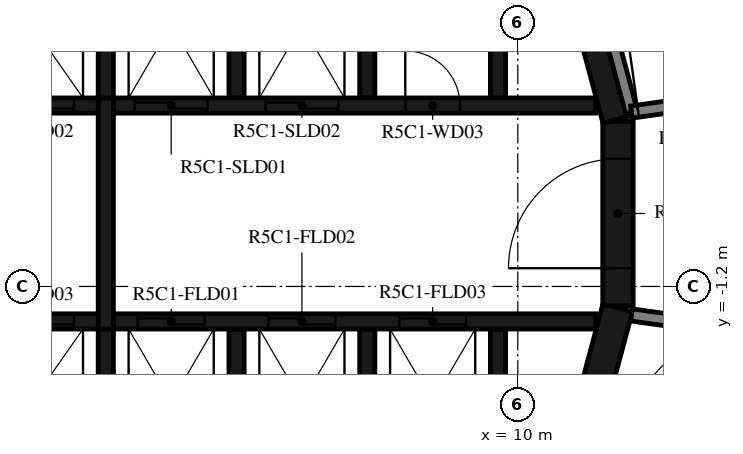
"""IFC4 building model, lengths in metres.
Left out: names, types, materials, properties, quantities, classifications, styles, units other than length and angle.
Written with IfcOpenShell. Run it as: python <this file> out.ifc"""

import sys

from ifc_helpers import new_model, si_unit, direction, frame, frame_2d, origin, place, context, subcontext, project, spatial, polyline, rectangle, outline, extrude, element, fill, save


model = new_model("IFC4")
c1 = context("Model", 3, precision=1e-05, world=origin(), true_north=direction((0.0, 1.0)))
c2 = subcontext(c1, "Body", "Model", "MODEL_VIEW")
j1 = project(units=[si_unit("LENGTHUNIT", "METRE"), si_unit("PLANEANGLEUNIT", "RADIAN")], contexts=[c1])
p1 = place(None, origin())
s1 = spatial("IfcSite", under=j1, at=p1, CompositionType="ELEMENT")
p2 = place(p1, origin())
s2 = spatial("IfcBuilding", under=s1, at=p2, CompositionType="ELEMENT")
p3 = place(p2, frame((0.0, 0.0, 212.9)))
s3 = spatial("IfcBuildingStorey", under=s2, at=p3, CompositionType="ELEMENT", Elevation=212.9)
p4 = place(p3, frame((10.858, -4.479, 0.0), z_axis=(0.0, 0.0, 1.0), x_axis=(0.258734743916, 0.965948410781, 0.0)))
e1 = element("IfcWall", 1, at=p4, inside=s3, PredefinedType="SHEAR", context=c2, shape_type="SweptSolid", body=[
    extrude(rectangle(XDim=3.033, YDim=0.5, at=frame_2d((1.516, 0.0))), origin(), (0.0, 0.0, 1.0), 3.12),
])
p5 = place(p3, frame((11.647, -1.516, 0.0), z_axis=(0.0, 0.0, 1.0), x_axis=(0.0, 1.0, 0.0)))
e2 = element("IfcWall", 2, at=p5, inside=s3, PredefinedType="SHEAR", context=c2, shape_type="SweptSolid", body=[
    extrude(rectangle(XDim=3.033, YDim=0.5, at=frame_2d((1.516, 0.0))), origin(), (0.0, 0.0, 1.0), 3.12),
])
p6 = place(p5, frame((0.616, 0.0, 0.0)))
e3 = element("IfcOpeningElement", 3, at=p6, cuts=e2, PredefinedType="OPENING", context=c2, shape_type="SweptSolid", body=[
    extrude(rectangle(XDim=1.8, YDim=2.1, at=frame_2d((0.9, 1.05))), frame((0.0, 0.26, 0.0), z_axis=(0.0, -1.0, 0.0), x_axis=(1.0, 0.0, 0.0)), (0.0, 0.0, 1.0), 0.52),
])
p7 = place(p3, frame((11.643, 1.55, 0.0), z_axis=(0.0, 0.0, 1.0), x_axis=(-0.258734743916, 0.965948410781, 0.0)))
e4 = element("IfcWall", 4, at=p7, inside=s3, PredefinedType="SHEAR", context=c2, shape_type="SweptSolid", body=[
    extrude(rectangle(XDim=3.033, YDim=0.5, at=frame_2d((1.516, 0.0))), origin(), (0.0, 0.0, 1.0), 3.12),
])
p8 = place(p3, origin())
e5 = element("IfcWall", 5, at=p8, inside=s3, PredefinedType="SHEAR", context=c2, shape_type="SweptSolid", body=[
    extrude(outline(polyline([(-9.55, 4.8), (-5.5, 4.8), (-5.5, 1.9), (-5.25, 1.9), (-5.25, 4.8), (-1.2, 4.8), (-1.2, 1.9), (-0.95, 1.9), (-0.95, 4.8), (0.95, 4.8), (0.95, 1.9), (1.2, 1.9), (1.2, 4.8), (3.1, 4.8), (3.1, 1.9), (3.35, 1.9), (3.35, 4.8), (5.25, 4.8), (5.25, 1.9), (5.5, 1.9), (5.5, 4.8), (7.4, 4.8), (7.4, 1.9), (7.65, 1.9), (7.65, 4.8), (9.55, 4.8), (9.55, 1.9), (9.8, 1.9), (9.8, 4.8), (9.8, 5.05), (-9.8, 5.05), (-9.8, 4.8), (-9.8, 1.9), (-9.55, 1.9), (-9.55, 4.8)])), origin(), (0.0, 0.0, 1.0), 3.12),
])
p9 = place(p3, origin())
e6 = element("IfcWall", 6, at=p9, inside=s3, PredefinedType="SHEAR", context=c2, shape_type="SweptSolid", body=[
    extrude(outline(polyline([(9.8, -5.05), (9.8, -4.8), (9.8, -1.9), (9.55, -1.9), (9.55, -4.8), (7.65, -4.8), (7.65, -1.9), (7.4, -1.9), (7.4, -4.8), (5.5, -4.8), (5.5, -1.9), (5.25, -1.9), (5.25, -4.8), (3.35, -4.8), (3.35, -1.9), (3.1, -1.9), (3.1, -4.8), (1.2, -4.8), (1.2, -1.9), (0.95, -1.9), (0.95, -4.8), (-5.25, -4.8), (-5.25, -1.9), (-5.5, -1.9), (-5.5, -4.8), (-7.4, -4.8), (-7.4, -1.9), (-7.65, -1.9), (-7.65, -4.8), (-9.55, -4.8), (-9.55, -1.9), (-9.8, -1.9), (-9.8, -4.8), (-9.8, -5.05), (9.8, -5.05)])), origin(), (0.0, 0.0, 1.0), 3.12),
])
p10 = place(p3, frame((-11.28, 1.775, 0.0), z_axis=(0.0, 0.0, 1.0), x_axis=(1.0, 0.0, 0.0)))
e7 = element("IfcWall", 7, at=p10, inside=s3, PredefinedType="SHEAR", context=c2, shape_type="SweptSolid", body=[
    extrude(rectangle(XDim=14.38, YDim=0.25, at=frame_2d((7.19, 0.0))), origin(), (0.0, 0.0, 1.0), 3.12),
])
p11 = place(p10, frame((10.73, 0.0, 0.0)))
e8 = element("IfcOpeningElement", 8, at=p11, cuts=e7, PredefinedType="OPENING", context=c2, shape_type="SweptSolid", body=[
    extrude(rectangle(XDim=1.1, YDim=2.1, at=frame_2d((0.55, 1.05))), frame((0.0, 0.135, 0.0), z_axis=(0.0, -1.0, 0.0), x_axis=(1.0, 0.0, 0.0)), (0.0, 0.0, 1.0), 0.27),
])
p12 = place(p10, frame((12.88, 0.0, 0.0)))
e9 = element("IfcOpeningElement", 9, at=p12, cuts=e7, PredefinedType="OPENING", context=c2, shape_type="SweptSolid", body=[
    extrude(rectangle(XDim=1.1, YDim=2.1, at=frame_2d((0.55, 1.05))), frame((0.0, 0.135, 0.0), z_axis=(0.0, -1.0, 0.0), x_axis=(1.0, 0.0, 0.0)), (0.0, 0.0, 1.0), 0.27),
])
p13 = place(p10, frame((3.305, 0.0, 0.0)))
e10 = element("IfcOpeningElement", 10, at=p13, cuts=e7, PredefinedType="OPENING", context=c2, shape_type="SweptSolid", body=[
    extrude(rectangle(XDim=0.9, YDim=2.1, at=frame_2d((0.45, 1.05))), frame((0.0, 0.135, 0.0), z_axis=(0.0, -1.0, 0.0), x_axis=(1.0, 0.0, 0.0)), (0.0, 0.0, 1.0), 0.27),
])
p14 = place(p10, frame((7.605, 0.0, 0.0)))
e11 = element("IfcOpeningElement", 11, at=p14, cuts=e7, PredefinedType="OPENING", context=c2, shape_type="SweptSolid", body=[
    extrude(rectangle(XDim=0.9, YDim=2.1, at=frame_2d((0.45, 1.05))), frame((0.0, 0.135, 0.0), z_axis=(0.0, -1.0, 0.0), x_axis=(1.0, 0.0, 0.0)), (0.0, 0.0, 1.0), 0.27),
])
p15 = place(p3, frame((3.35, 1.775, 0.0), z_axis=(0.0, 0.0, 1.0), x_axis=(1.0, 0.0, 0.0)))
e12 = element("IfcWall", 12, at=p15, inside=s3, PredefinedType="SHEAR", context=c2, shape_type="SweptSolid", body=[
    extrude(rectangle(XDim=7.93, YDim=0.25, at=frame_2d((3.965, 0.0))), origin(), (0.0, 0.0, 1.0), 3.12),
])
p16 = place(p15, frame((0.35, 0.0, 0.0)))
e13 = element("IfcOpeningElement", 13, at=p16, cuts=e12, PredefinedType="OPENING", context=c2, shape_type="SweptSolid", body=[
    extrude(rectangle(XDim=1.2, YDim=2.4, at=frame_2d((0.6, 1.2))), frame((0.0, 0.135, 0.0), z_axis=(0.0, -1.0, 0.0), x_axis=(1.0, 0.0, 0.0)), (0.0, 0.0, 1.0), 0.27),
])
p17 = place(p15, frame((2.5, 0.0, 0.0)))
e14 = element("IfcOpeningElement", 14, at=p17, cuts=e12, PredefinedType="OPENING", context=c2, shape_type="SweptSolid", body=[
    extrude(rectangle(XDim=1.2, YDim=2.4, at=frame_2d((0.6, 1.2))), frame((0.0, 0.135, 0.0), z_axis=(0.0, -1.0, 0.0), x_axis=(1.0, 0.0, 0.0)), (0.0, 0.0, 1.0), 0.27),
])
p18 = place(p15, frame((4.8, 0.0, 0.0)))
e15 = element("IfcOpeningElement", 15, at=p18, cuts=e12, PredefinedType="OPENING", context=c2, shape_type="SweptSolid", body=[
    extrude(rectangle(XDim=0.9, YDim=2.1, at=frame_2d((0.45, 1.05))), frame((0.0, 0.135, 0.0), z_axis=(0.0, -1.0, 0.0), x_axis=(1.0, 0.0, 0.0)), (0.0, 0.0, 1.0), 0.27),
])
p19 = place(p3, frame((-11.28, -1.775, 0.0), z_axis=(0.0, 0.0, 1.0), x_axis=(1.0, 0.0, 0.0)))
e16 = element("IfcWall", 16, at=p19, inside=s3, PredefinedType="SHEAR", context=c2, shape_type="SweptSolid", body=[
    extrude(rectangle(XDim=14.38, YDim=0.25, at=frame_2d((7.19, 0.0))), origin(), (0.0, 0.0, 1.0), 3.12),
])
p20 = place(p19, frame((12.88, 0.0, 0.0)))
e17 = element("IfcOpeningElement", 17, at=p20, cuts=e16, PredefinedType="OPENING", context=c2, shape_type="SweptSolid", body=[
    extrude(rectangle(XDim=1.1, YDim=2.1, at=frame_2d((0.55, 1.05))), frame((0.0, 0.135, 0.0), z_axis=(0.0, -1.0, 0.0), x_axis=(1.0, 0.0, 0.0)), (0.0, 0.0, 1.0), 0.27),
])
p21 = place(p19, frame((8.68, 0.0, 0.0)))
e18 = element("IfcOpeningElement", 18, at=p21, cuts=e16, PredefinedType="OPENING", context=c2, shape_type="SweptSolid", body=[
    extrude(rectangle(XDim=0.9, YDim=2.1, at=frame_2d((0.45, 1.05))), frame((0.0, 0.135, 0.0), z_axis=(0.0, -1.0, 0.0), x_axis=(1.0, 0.0, 0.0)), (0.0, 0.0, 1.0), 0.27),
])
p22 = place(p3, frame((3.35, -1.775, 0.0), z_axis=(0.0, 0.0, 1.0), x_axis=(1.0, 0.0, 0.0)))
e19 = element("IfcWall", 19, at=p22, inside=s3, PredefinedType="SHEAR", context=c2, shape_type="SweptSolid", body=[
    extrude(rectangle(XDim=7.93, YDim=0.25, at=frame_2d((3.965, 0.0))), origin(), (0.0, 0.0, 1.0), 3.12),
])
p23 = place(p22, frame((0.4, 0.0, 0.0)))
e20 = element("IfcOpeningElement", 20, at=p23, cuts=e19, PredefinedType="OPENING", context=c2, shape_type="SweptSolid", body=[
    extrude(rectangle(XDim=1.1, YDim=2.4, at=frame_2d((0.55, 1.2))), frame((0.0, 0.135, 0.0), z_axis=(0.0, -1.0, 0.0), x_axis=(1.0, 0.0, 0.0)), (0.0, 0.0, 1.0), 0.27),
])
p24 = place(p22, frame((2.55, 0.0, 0.0)))
e21 = element("IfcOpeningElement", 21, at=p24, cuts=e19, PredefinedType="OPENING", context=c2, shape_type="SweptSolid", body=[
    extrude(rectangle(XDim=1.1, YDim=2.4, at=frame_2d((0.55, 1.2))), frame((0.0, 0.135, 0.0), z_axis=(0.0, -1.0, 0.0), x_axis=(1.0, 0.0, 0.0)), (0.0, 0.0, 1.0), 0.27),
])
p25 = place(p22, frame((4.7, 0.0, 0.0)))
e22 = element("IfcOpeningElement", 22, at=p25, cuts=e19, PredefinedType="OPENING", context=c2, shape_type="SweptSolid", body=[
    extrude(rectangle(XDim=1.1, YDim=2.4, at=frame_2d((0.55, 1.2))), frame((0.0, 0.135, 0.0), z_axis=(0.0, -1.0, 0.0), x_axis=(1.0, 0.0, 0.0)), (0.0, 0.0, 1.0), 0.27),
])
p26 = place(p3, frame((3.225, -1.9, 0.0), z_axis=(0.0, 0.0, 1.0), x_axis=(0.0, 1.0, 0.0)))
e23 = element("IfcWall", 23, at=p26, inside=s3, PredefinedType="SHEAR", context=c2, shape_type="SweptSolid", body=[
    extrude(rectangle(XDim=3.8, YDim=0.25, at=frame_2d((1.9, 0.0))), origin(), (0.0, 0.0, 1.0), 3.12),
])
p27 = place(p3, frame((11.87, 1.668, 0.0), z_axis=(0.0, 0.0, 1.0), x_axis=(-0.258836880648, 0.965921047093, 0.0)))
e24 = element("IfcWall", 24, at=p27, inside=s3, PredefinedType="STANDARD", context=c2, shape_type="SweptSolid", body=[
    extrude(rectangle(XDim=1.695, YDim=0.2, at=frame_2d((0.848, 0.0))), origin(), (0.0, 0.0, 1.0), 3.12),
])
p28 = place(p3, frame((11.87, 1.668, 0.0), z_axis=(0.0, 0.0, 1.0), x_axis=(0.990271931984, 0.139145609792, 0.0)))
e25 = element("IfcWall", 25, at=p28, inside=s3, PredefinedType="STANDARD", context=c2, shape_type="SweptSolid", body=[
    extrude(rectangle(XDim=1.712, YDim=0.2, at=frame_2d((0.856, 0.0))), origin(), (0.0, 0.0, 1.0), 3.12),
])
p29 = place(p28, frame((0.11, 0.0, 0.0)))
e26 = element("IfcOpeningElement", 26, at=p29, cuts=e25, PredefinedType="OPENING", context=c2, shape_type="SweptSolid", body=[
    extrude(rectangle(XDim=1.2, YDim=2.1, at=frame_2d((0.6, 1.05))), frame((0.0, 0.11, 0.0), z_axis=(0.0, -1.0, 0.0), x_axis=(1.0, 0.0, 0.0)), (0.0, 0.0, 1.0), 0.22),
])
p30 = place(p3, frame((13.618, 2.647, 0.0), z_axis=(0.0, 0.0, 1.0), x_axis=(-0.438366026218, 0.898796543751, 0.0)))
e27 = element("IfcWall", 27, at=p30, inside=s3, PredefinedType="STANDARD", context=c2, shape_type="SweptSolid", body=[
    extrude(rectangle(XDim=7.181, YDim=0.2, at=frame_2d((3.591, 0.0))), origin(), (0.0, 0.0, 1.0), 3.12),
])
p31 = place(p3, frame((13.302, -1.869, 0.0), z_axis=(0.0, 0.0, 1.0), x_axis=(-0.990274397042, 0.13912806533, 0.0)))
e28 = element("IfcWall", 28, at=p31, inside=s3, PredefinedType="STANDARD", context=c2, shape_type="SweptSolid", body=[
    extrude(rectangle(XDim=1.446, YDim=0.2, at=frame_2d((0.723, 0.0))), origin(), (0.0, 0.0, 1.0), 3.12),
])
p32 = place(p6, origin())
e29 = element("IfcDoor", 29, at=p32, inside=s3, OperationType="DOUBLE_DOOR_SINGLE_SWING", PredefinedType="DOOR", context=c2, shape_type="SweptSolid", body=[
    extrude(rectangle(XDim=1.8, YDim=2.1, at=frame_2d((0.9, 1.05))), frame((0.0, 0.025, 0.0), z_axis=(0.0, -1.0, 0.0), x_axis=(1.0, 0.0, 0.0)), (0.0, 0.0, 1.0), 0.05),
])
fill(e3, e29)
p33 = place(p12, origin())
e30 = element("IfcDoor", 30, at=p33, inside=s3, OperationType="DOUBLE_DOOR_SLIDING", PredefinedType="DOOR", context=c2, shape_type="SweptSolid", body=[
    extrude(rectangle(XDim=1.1, YDim=2.1, at=frame_2d((0.55, 1.05))), frame((0.0, 0.025, 0.0), z_axis=(0.0, -1.0, 0.0), x_axis=(1.0, 0.0, 0.0)), (0.0, 0.0, 1.0), 0.05),
])
fill(e9, e30)
p34 = place(p16, origin())
e31 = element("IfcDoor", 31, at=p34, inside=s3, OperationType="DOUBLE_DOOR_SLIDING", PredefinedType="DOOR", context=c2, shape_type="SweptSolid", body=[
    extrude(rectangle(XDim=1.2, YDim=2.4, at=frame_2d((0.6, 1.2))), frame((0.0, 0.025, 0.0), z_axis=(0.0, -1.0, 0.0), x_axis=(1.0, 0.0, 0.0)), (0.0, 0.0, 1.0), 0.05),
])
fill(e13, e31)
p35 = place(p17, origin())
e32 = element("IfcDoor", 32, at=p35, inside=s3, OperationType="DOUBLE_DOOR_SLIDING", PredefinedType="DOOR", context=c2, shape_type="SweptSolid", body=[
    extrude(rectangle(XDim=1.2, YDim=2.4, at=frame_2d((0.6, 1.2))), frame((0.0, 0.025, 0.0), z_axis=(0.0, -1.0, 0.0), x_axis=(1.0, 0.0, 0.0)), (0.0, 0.0, 1.0), 0.05),
])
fill(e14, e32)
p36 = place(p20, origin())
e33 = element("IfcDoor", 33, at=p36, inside=s3, OperationType="DOUBLE_DOOR_SLIDING", PredefinedType="DOOR", context=c2, shape_type="SweptSolid", body=[
    extrude(rectangle(XDim=1.1, YDim=2.1, at=frame_2d((0.55, 1.05))), frame((0.0, 0.025, 0.0), z_axis=(0.0, -1.0, 0.0), x_axis=(1.0, 0.0, 0.0)), (0.0, 0.0, 1.0), 0.05),
])
fill(e17, e33)
p37 = place(p23, origin())
e34 = element("IfcDoor", 34, at=p37, inside=s3, OperationType="DOUBLE_DOOR_SLIDING", PredefinedType="DOOR", context=c2, shape_type="SweptSolid", body=[
    extrude(rectangle(XDim=1.1, YDim=2.4, at=frame_2d((0.55, 1.2))), frame((0.0, 0.025, 0.0), z_axis=(0.0, -1.0, 0.0), x_axis=(1.0, 0.0, 0.0)), (0.0, 0.0, 1.0), 0.05),
])
fill(e20, e34)
p38 = place(p24, origin())
e35 = element("IfcDoor", 35, at=p38, inside=s3, OperationType="DOUBLE_DOOR_SLIDING", PredefinedType="DOOR", context=c2, shape_type="SweptSolid", body=[
    extrude(rectangle(XDim=1.1, YDim=2.4, at=frame_2d((0.55, 1.2))), frame((0.0, 0.025, 0.0), z_axis=(0.0, -1.0, 0.0), x_axis=(1.0, 0.0, 0.0)), (0.0, 0.0, 1.0), 0.05),
])
fill(e21, e35)
p39 = place(p25, origin())
e36 = element("IfcDoor", 36, at=p39, inside=s3, OperationType="DOUBLE_DOOR_SLIDING", PredefinedType="DOOR", context=c2, shape_type="SweptSolid", body=[
    extrude(rectangle(XDim=1.1, YDim=2.4, at=frame_2d((0.55, 1.2))), frame((0.0, 0.025, 0.0), z_axis=(0.0, -1.0, 0.0), x_axis=(1.0, 0.0, 0.0)), (0.0, 0.0, 1.0), 0.05),
])
fill(e22, e36)
p40 = place(p18, origin())
e37 = element("IfcDoor", 37, at=p40, inside=s3, OperationType="SINGLE_SWING_LEFT", PredefinedType="DOOR", context=c2, shape_type="SweptSolid", body=[
    extrude(rectangle(XDim=0.9, YDim=2.1, at=frame_2d((0.45, 1.05))), frame((0.0, 0.025, 0.0), z_axis=(0.0, -1.0, 0.0), x_axis=(1.0, 0.0, 0.0)), (0.0, 0.0, 1.0), 0.05),
])
fill(e15, e37)
p41 = place(p29, origin())
e38 = element("IfcDoor", 38, at=p41, inside=s3, OperationType="DOUBLE_DOOR_SINGLE_SWING", PredefinedType="DOOR", context=c2, shape_type="SweptSolid", body=[
    extrude(rectangle(XDim=1.2, YDim=2.1, at=frame_2d((0.6, 1.05))), frame((0.0, 0.025, 0.0), z_axis=(0.0, -1.0, 0.0), x_axis=(1.0, 0.0, 0.0)), (0.0, 0.0, 1.0), 0.05),
])
fill(e26, e38)
save(model, sys.argv[1])
